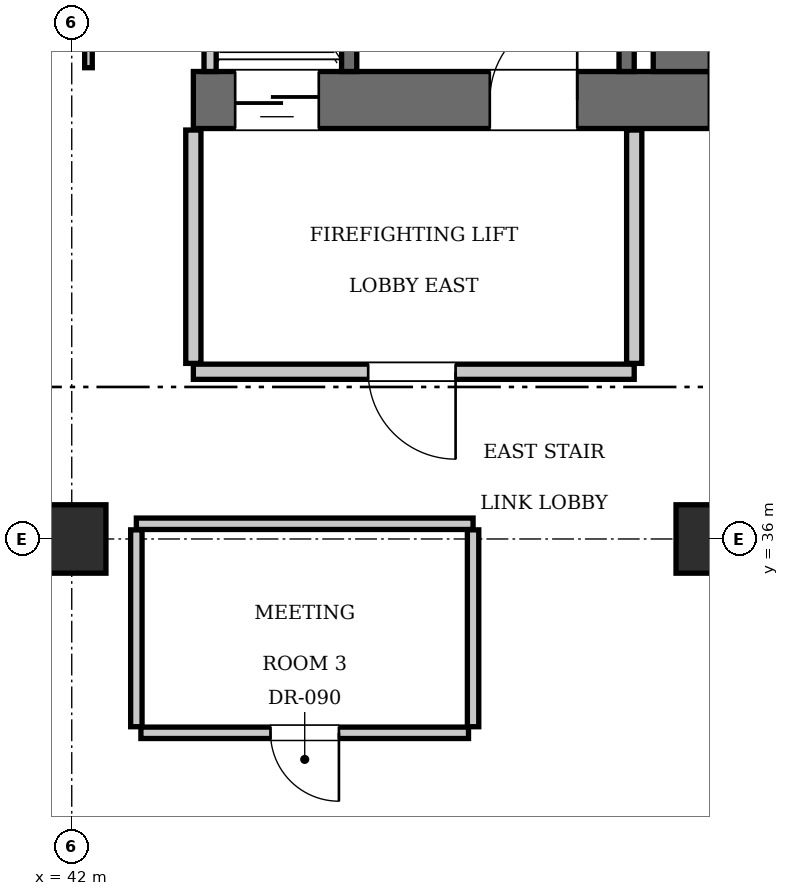
"""IFC4 building model, lengths in metres.
Left out: names, types, materials, properties, quantities, classifications, styles, units other than length and angle.
Written with IfcOpenShell. Run it as: python <this file> out.ifc"""

import sys

from ifc_helpers import new_model, si_unit, direction, frame, frame_2d, origin, origin_2d, place, context, subcontext, project, spatial, rectangle, extrude, element, fill, save


model = new_model("IFC4")
c1 = context("Model", 3, precision=1e-05, world=origin(), true_north=direction((0.0, 1.0)))
c2 = subcontext(c1, "Body", "Model", "MODEL_VIEW")
j1 = project(units=[si_unit("LENGTHUNIT", "METRE"), si_unit("PLANEANGLEUNIT", "RADIAN")], contexts=[c1])
p1 = place(None, origin())
s1 = spatial("IfcSite", under=j1, at=p1, CompositionType="ELEMENT")
p2 = place(p1, origin())
s2 = spatial("IfcBuilding", under=s1, at=p2, CompositionType="ELEMENT")
p3 = place(p2, frame((0.0, 0.0, 181.3)))
s3 = spatial("IfcBuildingStorey", under=s2, at=p3, CompositionType="ELEMENT", Elevation=181.3)
p4 = place(p3, frame((43.6, 41.775, 0.0), z_axis=(0.0, 0.0, 1.0), x_axis=(1.0, 0.0, 0.0)))
e1 = element("IfcWall", 1, at=p4, inside=s3, PredefinedType="SHEAR", context=c2, shape_type="SweptSolid", body=[
    extrude(rectangle(XDim=6.8, YDim=0.75, at=frame_2d((3.4, 0.0))), origin(), (0.0, 0.0, 1.0), 3.85),
])
p5 = place(p4, frame((3.9, 0.0, 0.0)))
e2 = element("IfcOpeningElement", 2, at=p5, cuts=e1, PredefinedType="OPENING", context=c2, shape_type="SweptSolid", body=[
    extrude(rectangle(XDim=1.15, YDim=2.15, at=frame_2d((0.575, 1.075))), frame((0.0, 0.385, 0.0), z_axis=(0.0, -1.0, 0.0), x_axis=(1.0, 0.0, 0.0)), (0.0, 0.0, 1.0), 0.77),
])
p6 = place(p4, frame((0.55, 0.0, 0.0)))
e3 = element("IfcOpeningElement", 3, at=p6, cuts=e1, PredefinedType="OPENING", context=c2, shape_type="SweptSolid", body=[
    extrude(rectangle(XDim=1.1, YDim=2.2, at=frame_2d((0.55, 1.1))), frame((0.0, 0.385, 0.0), z_axis=(0.0, -1.0, 0.0), x_axis=(1.0, 0.0, 0.0)), (0.0, 0.0, 1.0), 0.77),
])
p7 = place(p3, frame((50.025, 42.15, 0.0), z_axis=(0.0, 0.0, 1.0), x_axis=(0.0, 1.0, 0.0)))
e4 = element("IfcWall", 4, at=p7, inside=s3, PredefinedType="SHEAR", context=c2, shape_type="SweptSolid", body=[
    extrude(rectangle(XDim=1.9, YDim=0.75, at=frame_2d((0.95, 0.0))), origin(), (0.0, 0.0, 1.0), 3.85),
])
for number, where, z_axis, x_axis in (
    (5, (42.0, 36.0, 0.0), (0.0, 0.0, 1.0), (1.0, 0.0, 0.0)),
    (6, (50.4, 36.0, 0.0), (0.0, 0.0, 1.0), (1.0, 0.0, 0.0)),
):
    element("IfcColumn", number, at=place(p3, frame(where, z_axis=z_axis, x_axis=x_axis)), inside=s3, PredefinedType="COLUMN", context=c2, shape_type="SweptSolid", body=[
        extrude(rectangle(XDim=0.9, YDim=0.9, at=origin_2d()), origin(), (0.0, 0.0, 1.0), 3.85),
    ])
p8 = place(p3, frame((45.65, 42.15, 0.0), z_axis=(0.0, 0.0, 1.0), x_axis=(0.0, 1.0, 0.0)))
e7 = element("IfcWall", 7, at=p8, inside=s3, PredefinedType="SOLIDWALL", context=c2, shape_type="SweptSolid", body=[
    extrude(rectangle(XDim=9.0, YDim=0.2, at=frame_2d((4.5, 0.0))), origin(), (0.0, 0.0, 1.0), 3.61),
])
p9 = place(p3, frame((49.3, 42.15, 0.0), z_axis=(0.0, 0.0, 1.0), x_axis=(0.0, 1.0, 0.0)))
e8 = element("IfcWall", 8, at=p9, inside=s3, PredefinedType="SOLIDWALL", context=c2, shape_type="SweptSolid", body=[
    extrude(rectangle(XDim=1.87, YDim=0.2, at=frame_2d((0.935, 0.0))), origin(), (0.0, 0.0, 1.0), 3.61),
])
p10 = place(p3, frame((43.82, 42.15, 0.0), z_axis=(0.0, 0.0, 1.0), x_axis=(0.0, 1.0, 0.0)))
e9 = element("IfcWall", 9, at=p10, inside=s3, PredefinedType="SOLIDWALL", context=c2, shape_type="SweptSolid", body=[
    extrude(rectangle(XDim=2.59, YDim=0.16, at=frame_2d((1.295, 0.0))), origin(), (0.0, 0.0, 1.0), 3.61),
])
p11 = place(p3, frame((43.6, 38.2, 0.0), z_axis=(0.0, 0.0, 1.0), x_axis=(1.0, 0.0, 0.0)))
e10 = element("IfcWall", 10, at=p11, inside=s3, PredefinedType="PARTITIONING", context=c2, shape_type="SweptSolid", body=[
    extrude(rectangle(XDim=5.8, YDim=0.2, at=frame_2d((2.9, 0.0))), origin(), (0.0, 0.0, 1.0), 3.61),
])
p12 = place(p11, frame((2.3, 0.0, 0.0)))
e11 = element("IfcOpeningElement", 11, at=p12, cuts=e10, PredefinedType="OPENING", context=c2, shape_type="SweptSolid", body=[
    extrude(rectangle(XDim=1.15, YDim=2.15, at=frame_2d((0.575, 1.075))), frame((0.0, 0.11, 0.0), z_axis=(0.0, -1.0, 0.0), x_axis=(1.0, 0.0, 0.0)), (0.0, 0.0, 1.0), 0.22),
])
for number, where, z_axis, x_axis in (
    (12, (43.6, 38.31, 0.0), (0.0, 0.0, 1.0), (0.0, 1.0, 0.0)),
    (13, (49.4, 38.31, 0.0), (0.0, 0.0, 1.0), (0.0, 1.0, 0.0)),
):
    element("IfcWall", number, at=place(p3, frame(where, z_axis=z_axis, x_axis=x_axis)), inside=s3, PredefinedType="PARTITIONING", context=c2, shape_type="SweptSolid", body=[
        extrude(rectangle(XDim=3.07, YDim=0.2, at=frame_2d((1.535, 0.0))), origin(), (0.0, 0.0, 1.0), 3.61),
    ])
p13 = place(p3, frame((42.22, 42.2, 0.0), z_axis=(0.0, 0.0, 1.0), x_axis=(0.0, 1.0, 0.0)))
e14 = element("IfcWall", 14, at=p13, inside=s3, PredefinedType="PARTITIONING", context=c2, shape_type="SweptSolid", body=[
    extrude(rectangle(XDim=2.76, YDim=0.1, at=frame_2d((1.38, 0.0))), origin(), (0.0, 0.0, 1.0), 3.61),
])
p14 = place(p13, frame((0.65, 0.0, 0.0)))
e15 = element("IfcOpeningElement", 15, at=p14, cuts=e14, PredefinedType="OPENING", context=c2, shape_type="SweptSolid", body=[
    extrude(rectangle(XDim=0.8, YDim=2.05, at=frame_2d((0.4, 1.025))), frame((0.0, 0.06, 0.0), z_axis=(0.0, -1.0, 0.0), x_axis=(1.0, 0.0, 0.0)), (0.0, 0.0, 1.0), 0.12),
])
p15 = place(p3, frame((42.85, 36.2, 0.0), z_axis=(0.0, 0.0, 1.0), x_axis=(1.0, 0.0, 0.0)))
e16 = element("IfcWall", 16, at=p15, inside=s3, PredefinedType="PARTITIONING", context=c2, shape_type="SweptSolid", body=[
    extrude(rectangle(XDim=4.43, YDim=0.15, at=frame_2d((2.215, 0.0))), origin(), (0.0, 0.0, 1.0), 3.61),
])
for number, where, z_axis, x_axis in (
    (17, (42.85, 33.53, 0.0), (0.0, 0.0, 1.0), (0.0, 1.0, 0.0)),
    (18, (47.28, 33.53, 0.0), (0.0, 0.0, 1.0), (0.0, 1.0, 0.0)),
):
    element("IfcWall", number, at=place(p3, frame(where, z_axis=z_axis, x_axis=x_axis)), inside=s3, PredefinedType="PARTITIONING", context=c2, shape_type="SweptSolid", body=[
        extrude(rectangle(XDim=2.59, YDim=0.15, at=frame_2d((1.295, 0.0))), origin(), (0.0, 0.0, 1.0), 3.61),
    ])
p16 = place(p3, frame((42.91, 33.45, 0.0), z_axis=(0.0, 0.0, 1.0), x_axis=(1.0, 0.0, 0.0)))
e19 = element("IfcWall", 19, at=p16, inside=s3, PredefinedType="PARTITIONING", context=c2, shape_type="SweptSolid", body=[
    extrude(rectangle(XDim=4.31, YDim=0.15, at=frame_2d((2.155, 0.0))), origin(), (0.0, 0.0, 1.0), 3.61),
])
p17 = place(p16, frame((1.705, 0.0, 0.0)))
e20 = element("IfcOpeningElement", 20, at=p17, cuts=e19, PredefinedType="OPENING", context=c2, shape_type="SweptSolid", body=[
    extrude(rectangle(XDim=0.9, YDim=2.1, at=frame_2d((0.45, 1.05))), frame((0.0, 0.085, 0.0), z_axis=(0.0, -1.0, 0.0), x_axis=(1.0, 0.0, 0.0)), (0.0, 0.0, 1.0), 0.17),
])
p18 = place(p5, origin())
e21 = element("IfcDoor", 21, at=p18, inside=s3, OperationType="SINGLE_SWING_RIGHT", PredefinedType="DOOR", context=c2, shape_type="SweptSolid", body=[
    extrude(rectangle(XDim=1.15, YDim=2.15, at=frame_2d((0.575, 1.075))), frame((0.0, 0.025, 0.0), z_axis=(0.0, -1.0, 0.0), x_axis=(1.0, 0.0, 0.0)), (0.0, 0.0, 1.0), 0.05),
])
fill(e2, e21)
p19 = place(p6, frame((1.1, 0.0, 0.0), z_axis=(0.0, 0.0, 1.0), x_axis=(-1.0, 0.0, 0.0)))
e22 = element("IfcDoor", 22, at=p19, inside=s3, OperationType="SLIDING_TO_LEFT", PredefinedType="DOOR", context=c2, shape_type="SweptSolid", body=[
    extrude(rectangle(XDim=1.1, YDim=2.2, at=frame_2d((0.55, 1.1))), frame((0.0, 0.025, 0.0), z_axis=(0.0, -1.0, 0.0), x_axis=(1.0, 0.0, 0.0)), (0.0, 0.0, 1.0), 0.05),
])
fill(e3, e22)
p20 = place(p12, frame((1.15, 0.0, 0.0), z_axis=(0.0, 0.0, 1.0), x_axis=(-1.0, 0.0, 0.0)))
e23 = element("IfcDoor", 23, at=p20, inside=s3, OperationType="SINGLE_SWING_LEFT", PredefinedType="DOOR", context=c2, shape_type="SweptSolid", body=[
    extrude(rectangle(XDim=1.15, YDim=2.15, at=frame_2d((0.575, 1.075))), frame((0.0, 0.025, 0.0), z_axis=(0.0, -1.0, 0.0), x_axis=(1.0, 0.0, 0.0)), (0.0, 0.0, 1.0), 0.05),
])
fill(e11, e23)
p21 = place(p17, frame((0.9, 0.0, 0.0), z_axis=(0.0, 0.0, 1.0), x_axis=(-1.0, 0.0, 0.0)))
e24 = element("IfcDoor", 24, at=p21, inside=s3, OperationType="SINGLE_SWING_LEFT", PredefinedType="DOOR", context=c2, shape_type="SweptSolid", body=[
    extrude(rectangle(XDim=0.9, YDim=2.1, at=frame_2d((0.45, 1.05))), frame((0.0, 0.025, 0.0), z_axis=(0.0, -1.0, 0.0), x_axis=(1.0, 0.0, 0.0)), (0.0, 0.0, 1.0), 0.05),
])
fill(e20, e24)
save(model, sys.argv[1])
